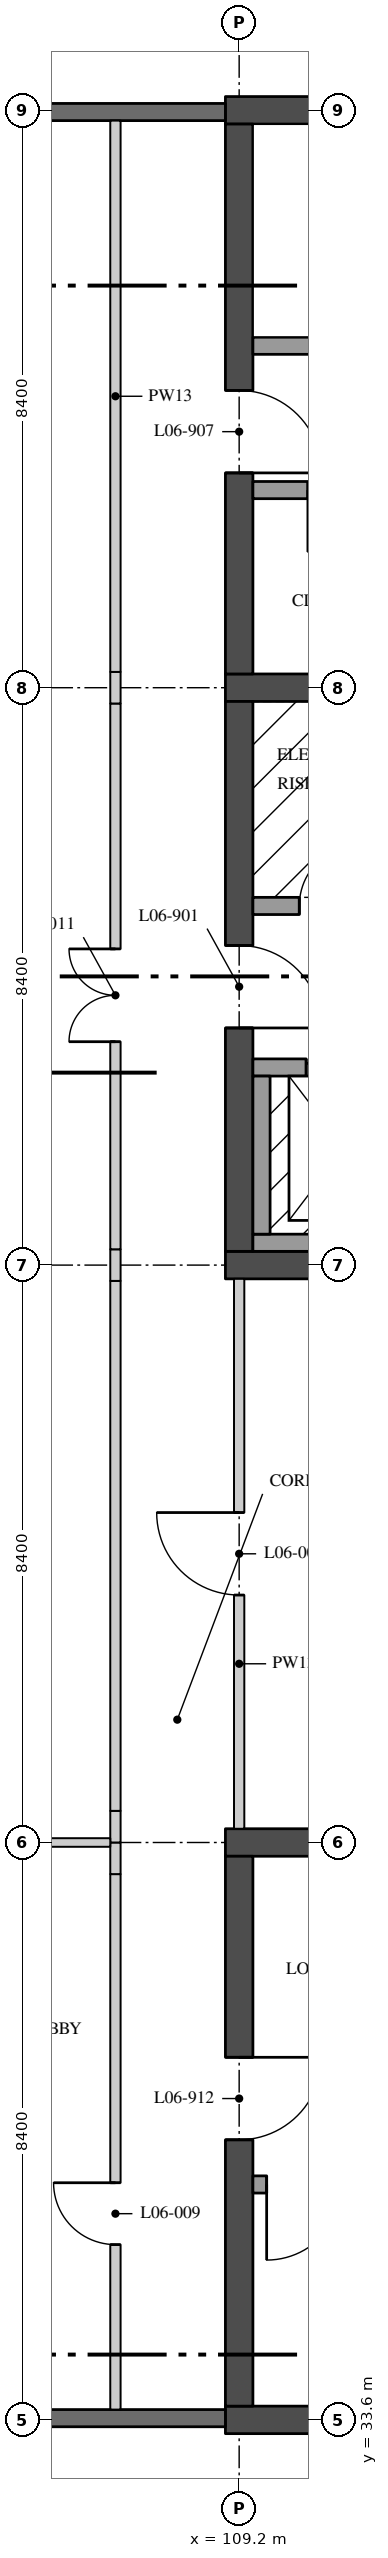
"""IFC4 building model, lengths in metres.
Left out: names, types, materials, properties, quantities, classifications, styles, units other than length and angle.
Written with IfcOpenShell. Run it as: python <this file> out.ifc"""

import sys

from ifc_helpers import new_model, si_unit, direction, frame, frame_2d, origin, place, context, subcontext, project, spatial, rectangle, extrude, element, fill, save


model = new_model("IFC4")
c1 = context("Model", 3, precision=1e-05, world=origin(), true_north=direction((0.0, 1.0)))
c2 = subcontext(c1, "Body", "Model", "MODEL_VIEW")
j1 = project(units=[si_unit("LENGTHUNIT", "METRE"), si_unit("PLANEANGLEUNIT", "RADIAN")], contexts=[c1])
p1 = place(None, origin())
s1 = spatial("IfcSite", under=j1, at=p1, CompositionType="ELEMENT")
p2 = place(p1, origin())
s2 = spatial("IfcBuilding", under=s1, at=p2, CompositionType="ELEMENT")
p3 = place(p2, frame((0.0, 0.0, 27.9)))
s3 = spatial("IfcBuildingStorey", under=s2, at=p3, CompositionType="ELEMENT", Elevation=27.9)
p4 = place(p3, frame((109.0, 50.4, 0.0), z_axis=(0.0, 0.0, 1.0), x_axis=(1.0, 0.0, 0.0)))
e1 = element("IfcWall", 1, at=p4, inside=s3, PredefinedType="SHEAR", context=c2, shape_type="SweptSolid", body=[
    extrude(rectangle(XDim=8.8, YDim=0.4, at=frame_2d((4.4, 0.0))), origin(), (0.0, 0.0, 1.0), 4.37),
])
p5 = place(p3, frame((109.0, 58.8, 0.0), z_axis=(0.0, 0.0, 1.0), x_axis=(1.0, 0.0, 0.0)))
e2 = element("IfcWall", 2, at=p5, inside=s3, PredefinedType="SHEAR", context=c2, shape_type="SweptSolid", body=[
    extrude(rectangle(XDim=8.8, YDim=0.4, at=frame_2d((4.4, 0.0))), origin(), (0.0, 0.0, 1.0), 4.37),
])
p6 = place(p5, frame((6.65, 0.0, 0.0)))
e3 = element("IfcOpeningElement", 3, at=p6, cuts=e2, PredefinedType="OPENING", context=c2, shape_type="SweptSolid", body=[
    extrude(rectangle(XDim=1.1, YDim=2.1, at=frame_2d((0.55, 1.05))), frame((0.0, 0.21, 0.0), z_axis=(0.0, -1.0, 0.0), x_axis=(1.0, 0.0, 0.0)), (0.0, 0.0, 1.0), 0.42),
])
p7 = place(p3, frame((109.2, 50.6, 0.0), z_axis=(0.0, 0.0, 1.0), x_axis=(0.0, 1.0, 0.0)))
e4 = element("IfcWall", 4, at=p7, inside=s3, PredefinedType="SHEAR", context=c2, shape_type="SweptSolid", body=[
    extrude(rectangle(XDim=8.0, YDim=0.4, at=frame_2d((4.0, 0.0))), origin(), (0.0, 0.0, 1.0), 4.37),
])
p8 = place(p7, frame((3.25, 0.0, 0.0)))
e5 = element("IfcOpeningElement", 5, at=p8, cuts=e4, PredefinedType="OPENING", context=c2, shape_type="SweptSolid", body=[
    extrude(rectangle(XDim=1.2, YDim=2.1, at=frame_2d((0.6, 1.05))), frame((0.0, 0.21, 0.0), z_axis=(0.0, -1.0, 0.0), x_axis=(1.0, 0.0, 0.0)), (0.0, 0.0, 1.0), 0.42),
])
p9 = place(p3, frame((109.4, 55.625, 0.0), z_axis=(0.0, 0.0, 1.0), x_axis=(1.0, 0.0, 0.0)))
e6 = element("IfcWall", 6, at=p9, inside=s3, PredefinedType="SOLIDWALL", context=c2, shape_type="SweptSolid", body=[
    extrude(rectangle(XDim=2.25, YDim=0.25, at=frame_2d((1.125, 0.0))), origin(), (0.0, 0.0, 1.0), 4.37),
])
p10 = place(p9, frame((0.675, 0.0, 0.0)))
e7 = element("IfcOpeningElement", 7, at=p10, cuts=e6, PredefinedType="OPENING", context=c2, shape_type="SweptSolid", body=[
    extrude(rectangle(XDim=0.9, YDim=2.1, at=frame_2d((0.45, 1.05))), frame((0.0, 0.135, 0.0), z_axis=(0.0, -1.0, 0.0), x_axis=(1.0, 0.0, 0.0)), (0.0, 0.0, 1.0), 0.27),
])
p11 = place(p3, frame((109.0, 67.2, 0.0), z_axis=(0.0, 0.0, 1.0), x_axis=(1.0, 0.0, 0.0)))
e8 = element("IfcWall", 8, at=p11, inside=s3, PredefinedType="SHEAR", context=c2, shape_type="SweptSolid", body=[
    extrude(rectangle(XDim=8.8, YDim=0.4, at=frame_2d((4.4, 0.0))), origin(), (0.0, 0.0, 1.0), 4.37),
])
p12 = place(p3, frame((109.2, 59.0, 0.0), z_axis=(0.0, 0.0, 1.0), x_axis=(0.0, 1.0, 0.0)))
e9 = element("IfcWall", 9, at=p12, inside=s3, PredefinedType="SHEAR", context=c2, shape_type="SweptSolid", body=[
    extrude(rectangle(XDim=8.0, YDim=0.4, at=frame_2d((4.0, 0.0))), origin(), (0.0, 0.0, 1.0), 4.37),
])
p13 = place(p12, frame((2.925, 0.0, 0.0)))
e10 = element("IfcOpeningElement", 10, at=p13, cuts=e9, PredefinedType="OPENING", context=c2, shape_type="SweptSolid", body=[
    extrude(rectangle(XDim=1.2, YDim=2.1, at=frame_2d((0.6, 1.05))), frame((0.0, 0.21, 0.0), z_axis=(0.0, -1.0, 0.0), x_axis=(1.0, 0.0, 0.0)), (0.0, 0.0, 1.0), 0.42),
])
p14 = place(p3, frame((117.4, 63.775, 0.0), z_axis=(0.0, 0.0, 1.0), x_axis=(-1.0, 0.0, 0.0)))
e11 = element("IfcWall", 11, at=p14, inside=s3, PredefinedType="SOLIDWALL", context=c2, shape_type="SweptSolid", body=[
    extrude(rectangle(XDim=8.0, YDim=0.25, at=frame_2d((4.0, 0.0))), origin(), (0.0, 0.0, 1.0), 4.37),
])
p15 = place(p14, frame((0.2, 0.0, 0.0)))
e12 = element("IfcOpeningElement", 12, at=p15, cuts=e11, PredefinedType="OPENING", context=c2, shape_type="SweptSolid", body=[
    extrude(rectangle(XDim=1.1, YDim=2.1, at=frame_2d((0.55, 1.05))), frame((0.0, 0.135, 0.0), z_axis=(0.0, -1.0, 0.0), x_axis=(1.0, 0.0, 0.0)), (0.0, 0.0, 1.0), 0.27),
])
p16 = place(p3, frame((114.75, 61.675, 0.0), z_axis=(0.0, 0.0, 1.0), x_axis=(-1.0, 0.0, 0.0)))
e13 = element("IfcWall", 13, at=p16, inside=s3, PredefinedType="SOLIDWALL", context=c2, shape_type="SweptSolid", body=[
    extrude(rectangle(XDim=5.35, YDim=0.25, at=frame_2d((2.675, 0.0))), origin(), (0.0, 0.0, 1.0), 4.37),
])
p17 = place(p16, frame((3.65, 0.0, 0.0)))
e14 = element("IfcOpeningElement", 14, at=p17, cuts=e13, PredefinedType="OPENING", context=c2, shape_type="SweptSolid", body=[
    extrude(rectangle(XDim=0.9, YDim=2.1, at=frame_2d((0.45, 1.05))), frame((0.0, 0.135, 0.0), z_axis=(0.0, -1.0, 0.0), x_axis=(1.0, 0.0, 0.0)), (0.0, 0.0, 1.0), 0.27),
])
p18 = place(p16, frame((0.9, 0.0, 0.0)))
e15 = element("IfcOpeningElement", 15, at=p18, cuts=e13, PredefinedType="OPENING", context=c2, shape_type="SweptSolid", body=[
    extrude(rectangle(XDim=0.8, YDim=2.1, at=frame_2d((0.4, 1.05))), frame((0.0, 0.135, 0.0), z_axis=(0.0, -1.0, 0.0), x_axis=(1.0, 0.0, 0.0)), (0.0, 0.0, 1.0), 0.27),
])
for number, where, z_axis, x_axis in (
    (16, (109.0, 33.6, 0.0), (0.0, 0.0, 1.0), (1.0, 0.0, 0.0)),
    (17, (109.0, 42.0, 0.0), (0.0, 0.0, 1.0), (1.0, 0.0, 0.0)),
):
    element("IfcWall", number, at=place(p3, frame(where, z_axis=z_axis, x_axis=x_axis)), inside=s3, PredefinedType="SHEAR", context=c2, shape_type="SweptSolid", body=[
        extrude(rectangle(XDim=8.8, YDim=0.4, at=frame_2d((4.4, 0.0))), origin(), (0.0, 0.0, 1.0), 4.37),
    ])
p19 = place(p3, frame((109.2, 33.8, 0.0), z_axis=(0.0, 0.0, 1.0), x_axis=(0.0, 1.0, 0.0)))
e18 = element("IfcWall", 18, at=p19, inside=s3, PredefinedType="SHEAR", context=c2, shape_type="SweptSolid", body=[
    extrude(rectangle(XDim=8.0, YDim=0.4, at=frame_2d((4.0, 0.0))), origin(), (0.0, 0.0, 1.0), 4.37),
])
p20 = place(p19, frame((3.875, 0.0, 0.0)))
e19 = element("IfcOpeningElement", 19, at=p20, cuts=e18, PredefinedType="OPENING", context=c2, shape_type="SweptSolid", body=[
    extrude(rectangle(XDim=1.2, YDim=2.1, at=frame_2d((0.6, 1.05))), frame((0.0, 0.21, 0.0), z_axis=(0.0, -1.0, 0.0), x_axis=(1.0, 0.0, 0.0)), (0.0, 0.0, 1.0), 0.42),
])
p21 = place(p3, frame((109.4, 37.025, 0.0), z_axis=(0.0, 0.0, 1.0), x_axis=(1.0, 0.0, 0.0)))
e20 = element("IfcWall", 20, at=p21, inside=s3, PredefinedType="SOLIDWALL", context=c2, shape_type="SweptSolid", body=[
    extrude(rectangle(XDim=8.0, YDim=0.25, at=frame_2d((4.0, 0.0))), origin(), (0.0, 0.0, 1.0), 4.37),
])
p22 = place(p21, frame((0.2, 0.0, 0.0)))
e21 = element("IfcOpeningElement", 21, at=p22, cuts=e20, PredefinedType="OPENING", context=c2, shape_type="SweptSolid", body=[
    extrude(rectangle(XDim=1.1, YDim=2.1, at=frame_2d((0.55, 1.05))), frame((0.0, 0.135, 0.0), z_axis=(0.0, -1.0, 0.0), x_axis=(1.0, 0.0, 0.0)), (0.0, 0.0, 1.0), 0.27),
])
p23 = place(p3, frame((109.4, 53.275, 0.0), z_axis=(0.0, 0.0, 1.0), x_axis=(1.0, 0.0, 0.0)))
e22 = element("IfcWall", 22, at=p23, inside=s3, PredefinedType="SOLIDWALL", context=c2, shape_type="SweptSolid", body=[
    extrude(rectangle(XDim=2.65, YDim=0.25, at=frame_2d((1.325, 0.0))), origin(), (0.0, 0.0, 1.0), 4.37),
])
p24 = place(p23, frame((0.775, 0.0, 0.0)))
e23 = element("IfcOpeningElement", 23, at=p24, cuts=e22, PredefinedType="OPENING", context=c2, shape_type="SweptSolid", body=[
    extrude(rectangle(XDim=1.1, YDim=2.1, at=frame_2d((0.55, 1.05))), frame((0.0, 0.135, 0.0), z_axis=(0.0, -1.0, 0.0), x_axis=(1.0, 0.0, 0.0)), (0.0, 0.0, 1.0), 0.27),
])
p25 = place(p3, frame((109.4, 50.725, 0.0), z_axis=(0.0, 0.0, 1.0), x_axis=(1.0, 0.0, 0.0)))
e24 = element("IfcWall", 24, at=p25, inside=s3, PredefinedType="SOLIDWALL", context=c2, shape_type="SweptSolid", body=[
    extrude(rectangle(XDim=2.65, YDim=0.25, at=frame_2d((1.325, 0.0))), origin(), (0.0, 0.0, 1.0), 4.37),
])
p26 = place(p3, frame((109.525, 50.85, 0.0), z_axis=(0.0, 0.0, 1.0), x_axis=(0.0, 1.0, 0.0)))
e25 = element("IfcWall", 25, at=p26, inside=s3, PredefinedType="SOLIDWALL", context=c2, shape_type="SweptSolid", body=[
    extrude(rectangle(XDim=2.3, YDim=0.25, at=frame_2d((1.15, 0.0))), origin(), (0.0, 0.0, 1.0), 4.37),
])
p27 = place(p3, frame((109.2, 42.2, 0.0), z_axis=(0.0, 0.0, 1.0), x_axis=(0.0, 1.0, 0.0)))
e26 = element("IfcWall", 26, at=p27, inside=s3, PredefinedType="PARTITIONING", context=c2, shape_type="SweptSolid", body=[
    extrude(rectangle(XDim=8.0, YDim=0.15, at=frame_2d((4.0, 0.0))), origin(), (0.0, 0.0, 1.0), 3.746),
])
p28 = place(p27, frame((3.4, 0.0, 0.0)))
e27 = element("IfcOpeningElement", 27, at=p28, cuts=e26, PredefinedType="OPENING", context=c2, shape_type="SweptSolid", body=[
    extrude(rectangle(XDim=1.2, YDim=2.4, at=frame_2d((0.6, 1.2))), frame((0.0, 0.085, 0.0), z_axis=(0.0, -1.0, 0.0), x_axis=(1.0, 0.0, 0.0)), (0.0, 0.0, 1.0), 0.17),
])
p29 = place(p3, frame((107.4, 33.75, 0.0), z_axis=(0.0, 0.0, 1.0), x_axis=(0.0, 1.0, 0.0)))
e28 = element("IfcWall", 28, at=p29, inside=s3, PredefinedType="PARTITIONING", context=c2, shape_type="SweptSolid", body=[
    extrude(rectangle(XDim=7.79, YDim=0.15, at=frame_2d((3.895, 0.0))), origin(), (0.0, 0.0, 1.0), 4.37),
])
p30 = place(p29, frame((2.4, 0.0, 0.0)))
e29 = element("IfcOpeningElement", 29, at=p30, cuts=e28, PredefinedType="OPENING", context=c2, shape_type="SweptSolid", body=[
    extrude(rectangle(XDim=0.9, YDim=2.1, at=frame_2d((0.45, 1.05))), frame((0.0, 0.085, 0.0), z_axis=(0.0, -1.0, 0.0), x_axis=(1.0, 0.0, 0.0)), (0.0, 0.0, 1.0), 0.17),
])
for number, where, z_axis, x_axis in (
    (30, (107.4, 41.54, 0.0), (0.0, 0.0, 1.0), (0.0, 1.0, 0.0)),
    (31, (107.4, 42.0, 0.0), (0.0, 0.0, 1.0), (0.0, 1.0, 0.0)),
):
    element("IfcWall", number, at=place(p3, frame(where, z_axis=z_axis, x_axis=x_axis)), inside=s3, PredefinedType="PARTITIONING", context=c2, shape_type="SweptSolid", body=[
        extrude(rectangle(XDim=0.46, YDim=0.15, at=frame_2d((0.23, 0.0))), origin(), (0.0, 0.0, 1.0), 3.746),
    ])
p31 = place(p3, frame((107.4, 42.46, 0.0), z_axis=(0.0, 0.0, 1.0), x_axis=(0.0, 1.0, 0.0)))
e32 = element("IfcWall", 32, at=p31, inside=s3, PredefinedType="PARTITIONING", context=c2, shape_type="SweptSolid", body=[
    extrude(rectangle(XDim=7.71, YDim=0.15, at=frame_2d((3.855, 0.0))), origin(), (0.0, 0.0, 1.0), 4.37),
])
p32 = place(p3, frame((107.4, 50.17, 0.0), z_axis=(0.0, 0.0, 1.0), x_axis=(0.0, 1.0, 0.0)))
e33 = element("IfcWall", 33, at=p32, inside=s3, PredefinedType="PARTITIONING", context=c2, shape_type="SweptSolid", body=[
    extrude(rectangle(XDim=0.46, YDim=0.15, at=frame_2d((0.23, 0.0))), origin(), (0.0, 0.0, 1.0), 3.746),
])
p33 = place(p3, frame((107.4, 50.63, 0.0), z_axis=(0.0, 0.0, 1.0), x_axis=(0.0, 1.0, 0.0)))
e34 = element("IfcWall", 34, at=p33, inside=s3, PredefinedType="PARTITIONING", context=c2, shape_type="SweptSolid", body=[
    extrude(rectangle(XDim=7.94, YDim=0.15, at=frame_2d((3.97, 0.0))), origin(), (0.0, 0.0, 1.0), 4.37),
])
p34 = place(p33, frame((3.02, 0.0, 0.0)))
e35 = element("IfcOpeningElement", 35, at=p34, cuts=e34, PredefinedType="OPENING", context=c2, shape_type="SweptSolid", body=[
    extrude(rectangle(XDim=1.35, YDim=2.1, at=frame_2d((0.675, 1.05))), frame((0.0, 0.085, 0.0), z_axis=(0.0, -1.0, 0.0), x_axis=(1.0, 0.0, 0.0)), (0.0, 0.0, 1.0), 0.17),
])
p35 = place(p3, frame((107.4, 58.57, 0.0), z_axis=(0.0, 0.0, 1.0), x_axis=(0.0, 1.0, 0.0)))
e36 = element("IfcWall", 36, at=p35, inside=s3, PredefinedType="PARTITIONING", context=c2, shape_type="SweptSolid", body=[
    extrude(rectangle(XDim=0.46, YDim=0.15, at=frame_2d((0.23, 0.0))), origin(), (0.0, 0.0, 1.0), 3.746),
])
p36 = place(p3, frame((107.4, 59.03, 0.0), z_axis=(0.0, 0.0, 1.0), x_axis=(0.0, 1.0, 0.0)))
e37 = element("IfcWall", 37, at=p36, inside=s3, PredefinedType="PARTITIONING", context=c2, shape_type="SweptSolid", body=[
    extrude(rectangle(XDim=8.02, YDim=0.15, at=frame_2d((4.01, 0.0))), origin(), (0.0, 0.0, 1.0), 4.37),
])
p37 = place(p3, frame((105.0, 42.0, 0.0), z_axis=(0.0, 0.0, 1.0), x_axis=(1.0, 0.0, 0.0)))
e38 = element("IfcWall", 38, at=p37, inside=s3, PredefinedType="PARTITIONING", context=c2, shape_type="SweptSolid", body=[
    extrude(rectangle(XDim=2.325, YDim=0.125, at=frame_2d((1.163, 0.0))), origin(), (0.0, 0.0, 1.0), 3.746),
])
p38 = place(p3, frame((109.0, 67.175, 0.0), z_axis=(0.0, 0.0, 1.0), x_axis=(-1.0, 0.0, 0.0)))
e39 = element("IfcWall", 39, at=p38, inside=s3, PredefinedType="SOLIDWALL", context=c2, shape_type="SweptSolid", body=[
    extrude(rectangle(XDim=8.196, YDim=0.25, at=frame_2d((4.098, 0.0))), origin(), (0.0, 0.0, 1.0), 3.746),
])
p39 = place(p38, frame((4.9, 0.0, 0.9)))
e40 = element("IfcOpeningElement", 40, at=p39, cuts=e39, PredefinedType="OPENING", context=c2, shape_type="SweptSolid", body=[
    extrude(rectangle(XDim=2.4, YDim=2.25, at=frame_2d((1.2, 1.125))), frame((0.0, 0.135, 0.0), z_axis=(0.0, -1.0, 0.0), x_axis=(1.0, 0.0, 0.0)), (0.0, 0.0, 1.0), 0.27),
])
p40 = place(p3, frame((100.804, 33.625, 0.0), z_axis=(0.0, 0.0, 1.0), x_axis=(1.0, 0.0, 0.0)))
e41 = element("IfcWall", 41, at=p40, inside=s3, PredefinedType="SOLIDWALL", context=c2, shape_type="SweptSolid", body=[
    extrude(rectangle(XDim=8.196, YDim=0.25, at=frame_2d((4.098, 0.0))), origin(), (0.0, 0.0, 1.0), 3.746),
])
p41 = place(p40, frame((1.646, 0.0, 1.5)))
e42 = element("IfcOpeningElement", 42, at=p41, cuts=e41, PredefinedType="OPENING", context=c2, shape_type="SweptSolid", body=[
    extrude(rectangle(XDim=0.9, YDim=1.2, at=frame_2d((0.45, 0.6))), frame((0.0, 0.135, 0.0), z_axis=(0.0, -1.0, 0.0), x_axis=(1.0, 0.0, 0.0)), (0.0, 0.0, 1.0), 0.27),
])
p42 = place(p8, frame((1.2, 0.0, 0.0), z_axis=(0.0, 0.0, 1.0), x_axis=(-1.0, 0.0, 0.0)))
e43 = element("IfcDoor", 43, at=p42, inside=s3, OperationType="SINGLE_SWING_LEFT", PredefinedType="DOOR", context=c2, shape_type="SweptSolid", body=[
    extrude(rectangle(XDim=1.2, YDim=2.1, at=frame_2d((0.6, 1.05))), frame((0.0, 0.035, 0.0), z_axis=(0.0, -1.0, 0.0), x_axis=(1.0, 0.0, 0.0)), (0.0, 0.0, 1.0), 0.07),
])
fill(e5, e43)
p43 = place(p10, origin())
e44 = element("IfcDoor", 44, at=p43, inside=s3, OperationType="SINGLE_SWING_LEFT", PredefinedType="DOOR", context=c2, shape_type="SweptSolid", body=[
    extrude(rectangle(XDim=0.9, YDim=2.1, at=frame_2d((0.45, 1.05))), frame((0.0, 0.05, 0.0), z_axis=(0.0, -1.0, 0.0), x_axis=(1.0, 0.0, 0.0)), (0.0, 0.0, 1.0), 0.1),
])
fill(e7, e44)
p44 = place(p13, frame((1.2, 0.0, 0.0), z_axis=(0.0, 0.0, 1.0), x_axis=(-1.0, 0.0, 0.0)))
e45 = element("IfcDoor", 45, at=p44, inside=s3, OperationType="SINGLE_SWING_LEFT", PredefinedType="DOOR", context=c2, shape_type="SweptSolid", body=[
    extrude(rectangle(XDim=1.2, YDim=2.1, at=frame_2d((0.6, 1.05))), frame((0.0, 0.035, 0.0), z_axis=(0.0, -1.0, 0.0), x_axis=(1.0, 0.0, 0.0)), (0.0, 0.0, 1.0), 0.07),
])
fill(e10, e45)
p45 = place(p20, frame((1.2, 0.0, 0.0), z_axis=(0.0, 0.0, 1.0), x_axis=(-1.0, 0.0, 0.0)))
e46 = element("IfcDoor", 46, at=p45, inside=s3, OperationType="SINGLE_SWING_RIGHT", PredefinedType="DOOR", context=c2, shape_type="SweptSolid", body=[
    extrude(rectangle(XDim=1.2, YDim=2.1, at=frame_2d((0.6, 1.05))), frame((0.0, 0.035, 0.0), z_axis=(0.0, -1.0, 0.0), x_axis=(1.0, 0.0, 0.0)), (0.0, 0.0, 1.0), 0.07),
])
fill(e19, e46)
p46 = place(p22, frame((1.1, 0.0, 0.0), z_axis=(0.0, 0.0, 1.0), x_axis=(-1.0, 0.0, 0.0)))
e47 = element("IfcDoor", 47, at=p46, inside=s3, OperationType="SINGLE_SWING_LEFT", PredefinedType="DOOR", context=c2, shape_type="SweptSolid", body=[
    extrude(rectangle(XDim=1.1, YDim=2.1, at=frame_2d((0.55, 1.05))), frame((0.0, 0.035, 0.0), z_axis=(0.0, -1.0, 0.0), x_axis=(1.0, 0.0, 0.0)), (0.0, 0.0, 1.0), 0.07),
])
fill(e21, e47)
p47 = place(p24, origin())
e48 = element("IfcDoor", 48, at=p47, inside=s3, OperationType="DOUBLE_DOOR_SLIDING", PredefinedType="DOOR", context=c2, shape_type="SweptSolid", body=[
    extrude(rectangle(XDim=1.1, YDim=2.1, at=frame_2d((0.55, 1.05))), frame((0.0, 0.04, 0.0), z_axis=(0.0, -1.0, 0.0), x_axis=(1.0, 0.0, 0.0)), (0.0, 0.0, 1.0), 0.08),
])
fill(e23, e48)
p48 = place(p28, origin())
e49 = element("IfcDoor", 49, at=p48, inside=s3, OperationType="SINGLE_SWING_LEFT", PredefinedType="DOOR", context=c2, shape_type="SweptSolid", body=[
    extrude(rectangle(XDim=1.2, YDim=2.4, at=frame_2d((0.6, 1.2))), frame((0.0, 0.025, 0.0), z_axis=(0.0, -1.0, 0.0), x_axis=(1.0, 0.0, 0.0)), (0.0, 0.0, 1.0), 0.05),
])
fill(e27, e49)
p49 = place(p30, origin())
e50 = element("IfcDoor", 50, at=p49, inside=s3, OperationType="SINGLE_SWING_LEFT", PredefinedType="DOOR", context=c2, shape_type="SweptSolid", body=[
    extrude(rectangle(XDim=0.9, YDim=2.1, at=frame_2d((0.45, 1.05))), frame((0.0, 0.025, 0.0), z_axis=(0.0, -1.0, 0.0), x_axis=(1.0, 0.0, 0.0)), (0.0, 0.0, 1.0), 0.05),
])
fill(e29, e50)
p50 = place(p34, origin())
e51 = element("IfcDoor", 51, at=p50, inside=s3, OperationType="DOUBLE_DOOR_SINGLE_SWING", PredefinedType="DOOR", context=c2, shape_type="SweptSolid", body=[
    extrude(rectangle(XDim=1.35, YDim=2.1, at=frame_2d((0.675, 1.05))), frame((0.0, 0.025, 0.0), z_axis=(0.0, -1.0, 0.0), x_axis=(1.0, 0.0, 0.0)), (0.0, 0.0, 1.0), 0.05),
])
fill(e35, e51)
save(model, sys.argv[1])
